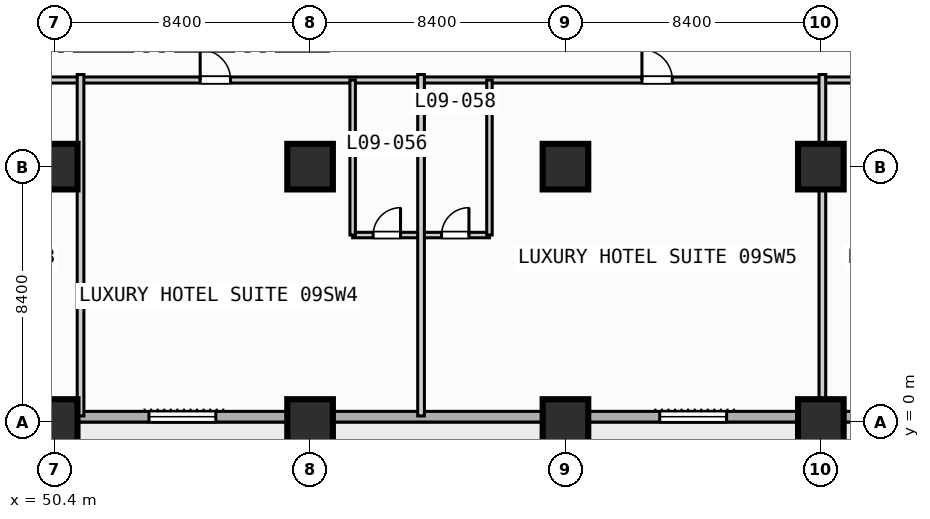
"""IFC4 building model, lengths in metres.
Left out: names, types, materials, properties, quantities, classifications, styles, units other than length and angle.
Written with IfcOpenShell. Run it as: python <this file> out.ifc"""

import sys

from ifc_helpers import new_model, si_unit, direction, frame, frame_2d, origin, origin_2d, place, context, subcontext, project, spatial, rectangle, extrude, element, fill, save


model = new_model("IFC4")
c1 = context("Model", 3, precision=1e-05, world=origin(), true_north=direction((0.0, 1.0)))
c2 = subcontext(c1, "Body", "Model", "MODEL_VIEW")
j1 = project(units=[si_unit("LENGTHUNIT", "METRE"), si_unit("PLANEANGLEUNIT", "RADIAN")], contexts=[c1])
p1 = place(None, origin())
s1 = spatial("IfcSite", under=j1, at=p1, CompositionType="ELEMENT")
p2 = place(p1, origin())
s2 = spatial("IfcBuilding", under=s1, at=p2, CompositionType="ELEMENT")
p3 = place(p2, frame((0.0, 0.0, 43.4)))
s3 = spatial("IfcBuildingStorey", under=s2, at=p3, CompositionType="ELEMENT", Elevation=43.4)
for number, where, z_axis, x_axis in (
    (1, (50.4, 0.0, 0.0), (0.0, 0.0, 1.0), (1.0, 0.0, 0.0)),
    (2, (50.4, 8.4, 0.0), (0.0, 0.0, 1.0), (1.0, 0.0, 0.0)),
    (3, (58.8, 0.0, 0.0), (0.0, 0.0, 1.0), (1.0, 0.0, 0.0)),
    (4, (58.8, 8.4, 0.0), (0.0, 0.0, 1.0), (1.0, 0.0, 0.0)),
    (5, (67.2, 0.0, 0.0), (0.0, 0.0, 1.0), (1.0, 0.0, 0.0)),
    (6, (67.2, 8.4, 0.0), (0.0, 0.0, 1.0), (1.0, 0.0, 0.0)),
    (7, (75.6, 0.0, 0.0), (0.0, 0.0, 1.0), (1.0, 0.0, 0.0)),
    (8, (75.6, 8.4, 0.0), (0.0, 0.0, 1.0), (1.0, 0.0, 0.0)),
):
    element("IfcColumn", number, at=place(p3, frame(where, z_axis=z_axis, x_axis=x_axis)), inside=s3, PredefinedType="COLUMN", context=c2, shape_type="SweptSolid", body=[
        extrude(rectangle(XDim=1.5, YDim=1.5, at=origin_2d()), origin(), (0.0, 0.0, 1.0), 3.8),
    ])
p4 = place(p3, frame((89.225, 0.175, 0.0), z_axis=(0.0, 0.0, 1.0), x_axis=(-1.0, 0.0, 0.0)))
e9 = element("IfcWall", 9, at=p4, inside=s3, PredefinedType="STANDARD", context=c2, shape_type="SweptSolid", body=[
    extrude(rectangle(XDim=86.05, YDim=0.35, at=frame_2d((43.025, 0.0))), origin(), (0.0, 0.0, 1.0), 3.55),
])
p5 = place(p4, frame((67.525, 0.0, 0.0)))
e10 = element("IfcOpeningElement", 10, at=p5, cuts=e9, PredefinedType="OPENING", context=c2, shape_type="SweptSolid", body=[
    extrude(rectangle(XDim=1.4, YDim=2.2, at=frame_2d((0.7, 1.1))), frame((0.0, 0.185, 0.0), z_axis=(0.0, -1.0, 0.0), x_axis=(1.0, 0.0, 0.0)), (0.0, 0.0, 1.0), 0.37),
])
p6 = place(p4, frame((58.725, 0.0, 0.85)))
e11 = element("IfcOpeningElement", 11, at=p6, cuts=e9, PredefinedType="OPENING", context=c2, shape_type="SweptSolid", body=[
    extrude(rectangle(XDim=2.2, YDim=1.8, at=frame_2d((1.1, 0.9))), frame((0.0, 0.185, 0.0), z_axis=(0.0, -1.0, 0.0), x_axis=(1.0, 0.0, 0.0)), (0.0, 0.0, 1.0), 0.37),
])
p7 = place(p4, frame((41.925, 0.0, 0.85)))
e12 = element("IfcOpeningElement", 12, at=p7, cuts=e9, PredefinedType="OPENING", context=c2, shape_type="SweptSolid", body=[
    extrude(rectangle(XDim=2.2, YDim=1.8, at=frame_2d((1.1, 0.9))), frame((0.0, 0.185, 0.0), z_axis=(0.0, -1.0, 0.0), x_axis=(1.0, 0.0, 0.0)), (0.0, 0.0, 1.0), 0.37),
])
p8 = place(p4, frame((33.525, 0.0, 0.85)))
e13 = element("IfcOpeningElement", 13, at=p8, cuts=e9, PredefinedType="OPENING", context=c2, shape_type="SweptSolid", body=[
    extrude(rectangle(XDim=2.2, YDim=1.8, at=frame_2d((1.1, 0.9))), frame((0.0, 0.185, 0.0), z_axis=(0.0, -1.0, 0.0), x_axis=(1.0, 0.0, 0.0)), (0.0, 0.0, 1.0), 0.37),
])
p9 = place(p4, frame((16.725, 0.0, 0.85)))
e14 = element("IfcOpeningElement", 14, at=p9, cuts=e9, PredefinedType="OPENING", context=c2, shape_type="SweptSolid", body=[
    extrude(rectangle(XDim=2.2, YDim=1.8, at=frame_2d((1.1, 0.9))), frame((0.0, 0.185, 0.0), z_axis=(0.0, -1.0, 0.0), x_axis=(1.0, 0.0, 0.0)), (0.0, 0.0, 1.0), 0.37),
])
p10 = place(p4, frame((8.325, 0.0, 0.85)))
e15 = element("IfcOpeningElement", 15, at=p10, cuts=e9, PredefinedType="OPENING", context=c2, shape_type="SweptSolid", body=[
    extrude(rectangle(XDim=2.2, YDim=1.8, at=frame_2d((1.1, 0.9))), frame((0.0, 0.185, 0.0), z_axis=(0.0, -1.0, 0.0), x_axis=(1.0, 0.0, 0.0)), (0.0, 0.0, 1.0), 0.37),
])
p11 = place(p3, frame((13.65, 11.25, 0.0), z_axis=(0.0, 0.0, 1.0), x_axis=(1.0, 0.0, 0.0)))
e16 = element("IfcWall", 16, at=p11, inside=s3, PredefinedType="PARTITIONING", context=c2, shape_type="SweptSolid", body=[
    extrude(rectangle(XDim=75.15, YDim=0.2, at=frame_2d((37.575, 0.0))), origin(), (0.0, 0.0, 1.0), 3.55),
])
p12 = place(p11, frame((7.265, 0.0, 0.0)))
e17 = element("IfcOpeningElement", 17, at=p12, cuts=e16, PredefinedType="OPENING", context=c2, shape_type="SweptSolid", body=[
    extrude(rectangle(XDim=1.0, YDim=2.15, at=frame_2d((0.5, 1.075))), frame((0.0, 0.11, 0.0), z_axis=(0.0, -1.0, 0.0), x_axis=(1.0, 0.0, 0.0)), (0.0, 0.0, 1.0), 0.22),
])
p13 = place(p11, frame((17.135, 0.0, 0.0)))
e18 = element("IfcOpeningElement", 18, at=p13, cuts=e16, PredefinedType="OPENING", context=c2, shape_type="SweptSolid", body=[
    extrude(rectangle(XDim=1.0, YDim=2.15, at=frame_2d((0.5, 1.075))), frame((0.0, 0.11, 0.0), z_axis=(0.0, -1.0, 0.0), x_axis=(1.0, 0.0, 0.0)), (0.0, 0.0, 1.0), 0.22),
])
p14 = place(p11, frame((31.665, 0.0, 0.0)))
e19 = element("IfcOpeningElement", 19, at=p14, cuts=e16, PredefinedType="OPENING", context=c2, shape_type="SweptSolid", body=[
    extrude(rectangle(XDim=1.0, YDim=2.15, at=frame_2d((0.5, 1.075))), frame((0.0, 0.11, 0.0), z_axis=(0.0, -1.0, 0.0), x_axis=(1.0, 0.0, 0.0)), (0.0, 0.0, 1.0), 0.22),
])
p15 = place(p11, frame((41.535, 0.0, 0.0)))
e20 = element("IfcOpeningElement", 20, at=p15, cuts=e16, PredefinedType="OPENING", context=c2, shape_type="SweptSolid", body=[
    extrude(rectangle(XDim=1.0, YDim=2.15, at=frame_2d((0.5, 1.075))), frame((0.0, 0.11, 0.0), z_axis=(0.0, -1.0, 0.0), x_axis=(1.0, 0.0, 0.0)), (0.0, 0.0, 1.0), 0.22),
])
p16 = place(p11, frame((56.065, 0.0, 0.0)))
e21 = element("IfcOpeningElement", 21, at=p16, cuts=e16, PredefinedType="OPENING", context=c2, shape_type="SweptSolid", body=[
    extrude(rectangle(XDim=1.0, YDim=2.15, at=frame_2d((0.5, 1.075))), frame((0.0, 0.11, 0.0), z_axis=(0.0, -1.0, 0.0), x_axis=(1.0, 0.0, 0.0)), (0.0, 0.0, 1.0), 0.22),
])
p17 = place(p11, frame((66.91, 0.0, 0.0)))
e22 = element("IfcOpeningElement", 22, at=p17, cuts=e16, PredefinedType="OPENING", context=c2, shape_type="SweptSolid", body=[
    extrude(rectangle(XDim=1.0, YDim=2.15, at=frame_2d((0.5, 1.075))), frame((0.0, 0.11, 0.0), z_axis=(0.0, -1.0, 0.0), x_axis=(1.0, 0.0, 0.0)), (0.0, 0.0, 1.0), 0.22),
])
p18 = place(p3, frame((51.25, 0.2, 0.0), z_axis=(0.0, 0.0, 1.0), x_axis=(0.0, 1.0, 0.0)))
e23 = element("IfcWall", 23, at=p18, inside=s3, PredefinedType="PARTITIONING", context=c2, shape_type="SweptSolid", body=[
    extrude(rectangle(XDim=11.23, YDim=0.22, at=frame_2d((5.615, 0.0))), origin(), (0.0, 0.0, 1.0), 3.55),
])
p19 = place(p3, frame((60.2, 6.15, 0.0), z_axis=(0.0, 0.0, 1.0), x_axis=(1.0, 0.0, 0.0)))
e24 = element("IfcWall", 24, at=p19, inside=s3, PredefinedType="PLUMBINGWALL", context=c2, shape_type="SweptSolid", body=[
    extrude(rectangle(XDim=4.5, YDim=0.18, at=frame_2d((2.25, 0.0))), origin(), (0.0, 0.0, 1.0), 3.55),
])
p20 = place(p19, frame((0.675, 0.0, 0.0)))
e25 = element("IfcOpeningElement", 25, at=p20, cuts=e24, PredefinedType="OPENING", context=c2, shape_type="SweptSolid", body=[
    extrude(rectangle(XDim=0.9, YDim=2.1, at=frame_2d((0.45, 1.05))), frame((0.0, 0.1, 0.0), z_axis=(0.0, -1.0, 0.0), x_axis=(1.0, 0.0, 0.0)), (0.0, 0.0, 1.0), 0.2),
])
p21 = place(p19, frame((2.925, 0.0, 0.0)))
e26 = element("IfcOpeningElement", 26, at=p21, cuts=e24, PredefinedType="OPENING", context=c2, shape_type="SweptSolid", body=[
    extrude(rectangle(XDim=0.9, YDim=2.1, at=frame_2d((0.45, 1.05))), frame((0.0, 0.1, 0.0), z_axis=(0.0, -1.0, 0.0), x_axis=(1.0, 0.0, 0.0)), (0.0, 0.0, 1.0), 0.2),
])
p22 = place(p3, frame((60.2, 6.15, 0.0), z_axis=(0.0, 0.0, 1.0), x_axis=(0.0, 1.0, 0.0)))
e27 = element("IfcWall", 27, at=p22, inside=s3, PredefinedType="PLUMBINGWALL", context=c2, shape_type="SweptSolid", body=[
    extrude(rectangle(XDim=5.1, YDim=0.18, at=frame_2d((2.55, 0.0))), origin(), (0.0, 0.0, 1.0), 3.55),
])
p23 = place(p3, frame((62.45, 0.2, 0.0), z_axis=(0.0, 0.0, 1.0), x_axis=(0.0, 1.0, 0.0)))
e28 = element("IfcWall", 28, at=p23, inside=s3, PredefinedType="PARTITIONING", context=c2, shape_type="SweptSolid", body=[
    extrude(rectangle(XDim=11.23, YDim=0.22, at=frame_2d((5.615, 0.0))), origin(), (0.0, 0.0, 1.0), 3.55),
])
p24 = place(p3, frame((64.7, 6.15, 0.0), z_axis=(0.0, 0.0, 1.0), x_axis=(0.0, 1.0, 0.0)))
e29 = element("IfcWall", 29, at=p24, inside=s3, PredefinedType="PLUMBINGWALL", context=c2, shape_type="SweptSolid", body=[
    extrude(rectangle(XDim=5.1, YDim=0.18, at=frame_2d((2.55, 0.0))), origin(), (0.0, 0.0, 1.0), 3.55),
])
p25 = place(p3, frame((75.65, 0.2, 0.0), z_axis=(0.0, 0.0, 1.0), x_axis=(0.0, 1.0, 0.0)))
e30 = element("IfcWall", 30, at=p25, inside=s3, PredefinedType="PARTITIONING", context=c2, shape_type="SweptSolid", body=[
    extrude(rectangle(XDim=11.23, YDim=0.22, at=frame_2d((5.615, 0.0))), origin(), (0.0, 0.0, 1.0), 2.8),
])
p26 = place(p8, origin())
e31 = element("IfcWindow", 31, at=p26, inside=s3, PartitioningType="SINGLE_PANEL", PredefinedType="WINDOW", context=c2, shape_type="SweptSolid", body=[
    extrude(rectangle(XDim=2.2, YDim=1.8, at=frame_2d((1.1, 0.9))), frame((0.0, 0.03, 0.0), z_axis=(0.0, -1.0, 0.0), x_axis=(1.0, 0.0, 0.0)), (0.0, 0.0, 1.0), 0.06),
])
fill(e13, e31)
p27 = place(p9, origin())
e32 = element("IfcWindow", 32, at=p27, inside=s3, PartitioningType="SINGLE_PANEL", PredefinedType="WINDOW", context=c2, shape_type="SweptSolid", body=[
    extrude(rectangle(XDim=2.2, YDim=1.8, at=frame_2d((1.1, 0.9))), frame((0.0, 0.03, 0.0), z_axis=(0.0, -1.0, 0.0), x_axis=(1.0, 0.0, 0.0)), (0.0, 0.0, 1.0), 0.06),
])
fill(e14, e32)
p28 = place(p15, origin())
e33 = element("IfcDoor", 33, at=p28, inside=s3, OperationType="SINGLE_SWING_LEFT", PredefinedType="DOOR", context=c2, shape_type="SweptSolid", body=[
    extrude(rectangle(XDim=1.0, YDim=2.15, at=frame_2d((0.5, 1.075))), frame((0.0, 0.025, 0.0), z_axis=(0.0, -1.0, 0.0), x_axis=(1.0, 0.0, 0.0)), (0.0, 0.0, 1.0), 0.05),
])
fill(e20, e33)
p29 = place(p16, origin())
e34 = element("IfcDoor", 34, at=p29, inside=s3, OperationType="SINGLE_SWING_LEFT", PredefinedType="DOOR", context=c2, shape_type="SweptSolid", body=[
    extrude(rectangle(XDim=1.0, YDim=2.15, at=frame_2d((0.5, 1.075))), frame((0.0, 0.025, 0.0), z_axis=(0.0, -1.0, 0.0), x_axis=(1.0, 0.0, 0.0)), (0.0, 0.0, 1.0), 0.05),
])
fill(e21, e34)
p30 = place(p20, origin())
e35 = element("IfcDoor", 35, at=p30, inside=s3, OperationType="SINGLE_SWING_RIGHT", PredefinedType="DOOR", context=c2, shape_type="SweptSolid", body=[
    extrude(rectangle(XDim=0.9, YDim=2.1, at=frame_2d((0.45, 1.05))), frame((0.0, 0.025, 0.0), z_axis=(0.0, -1.0, 0.0), x_axis=(1.0, 0.0, 0.0)), (0.0, 0.0, 1.0), 0.05),
])
fill(e25, e35)
p31 = place(p21, origin())
e36 = element("IfcDoor", 36, at=p31, inside=s3, OperationType="SINGLE_SWING_RIGHT", PredefinedType="DOOR", context=c2, shape_type="SweptSolid", body=[
    extrude(rectangle(XDim=0.9, YDim=2.1, at=frame_2d((0.45, 1.05))), frame((0.0, 0.025, 0.0), z_axis=(0.0, -1.0, 0.0), x_axis=(1.0, 0.0, 0.0)), (0.0, 0.0, 1.0), 0.05),
])
fill(e26, e36)
save(model, sys.argv[1])
